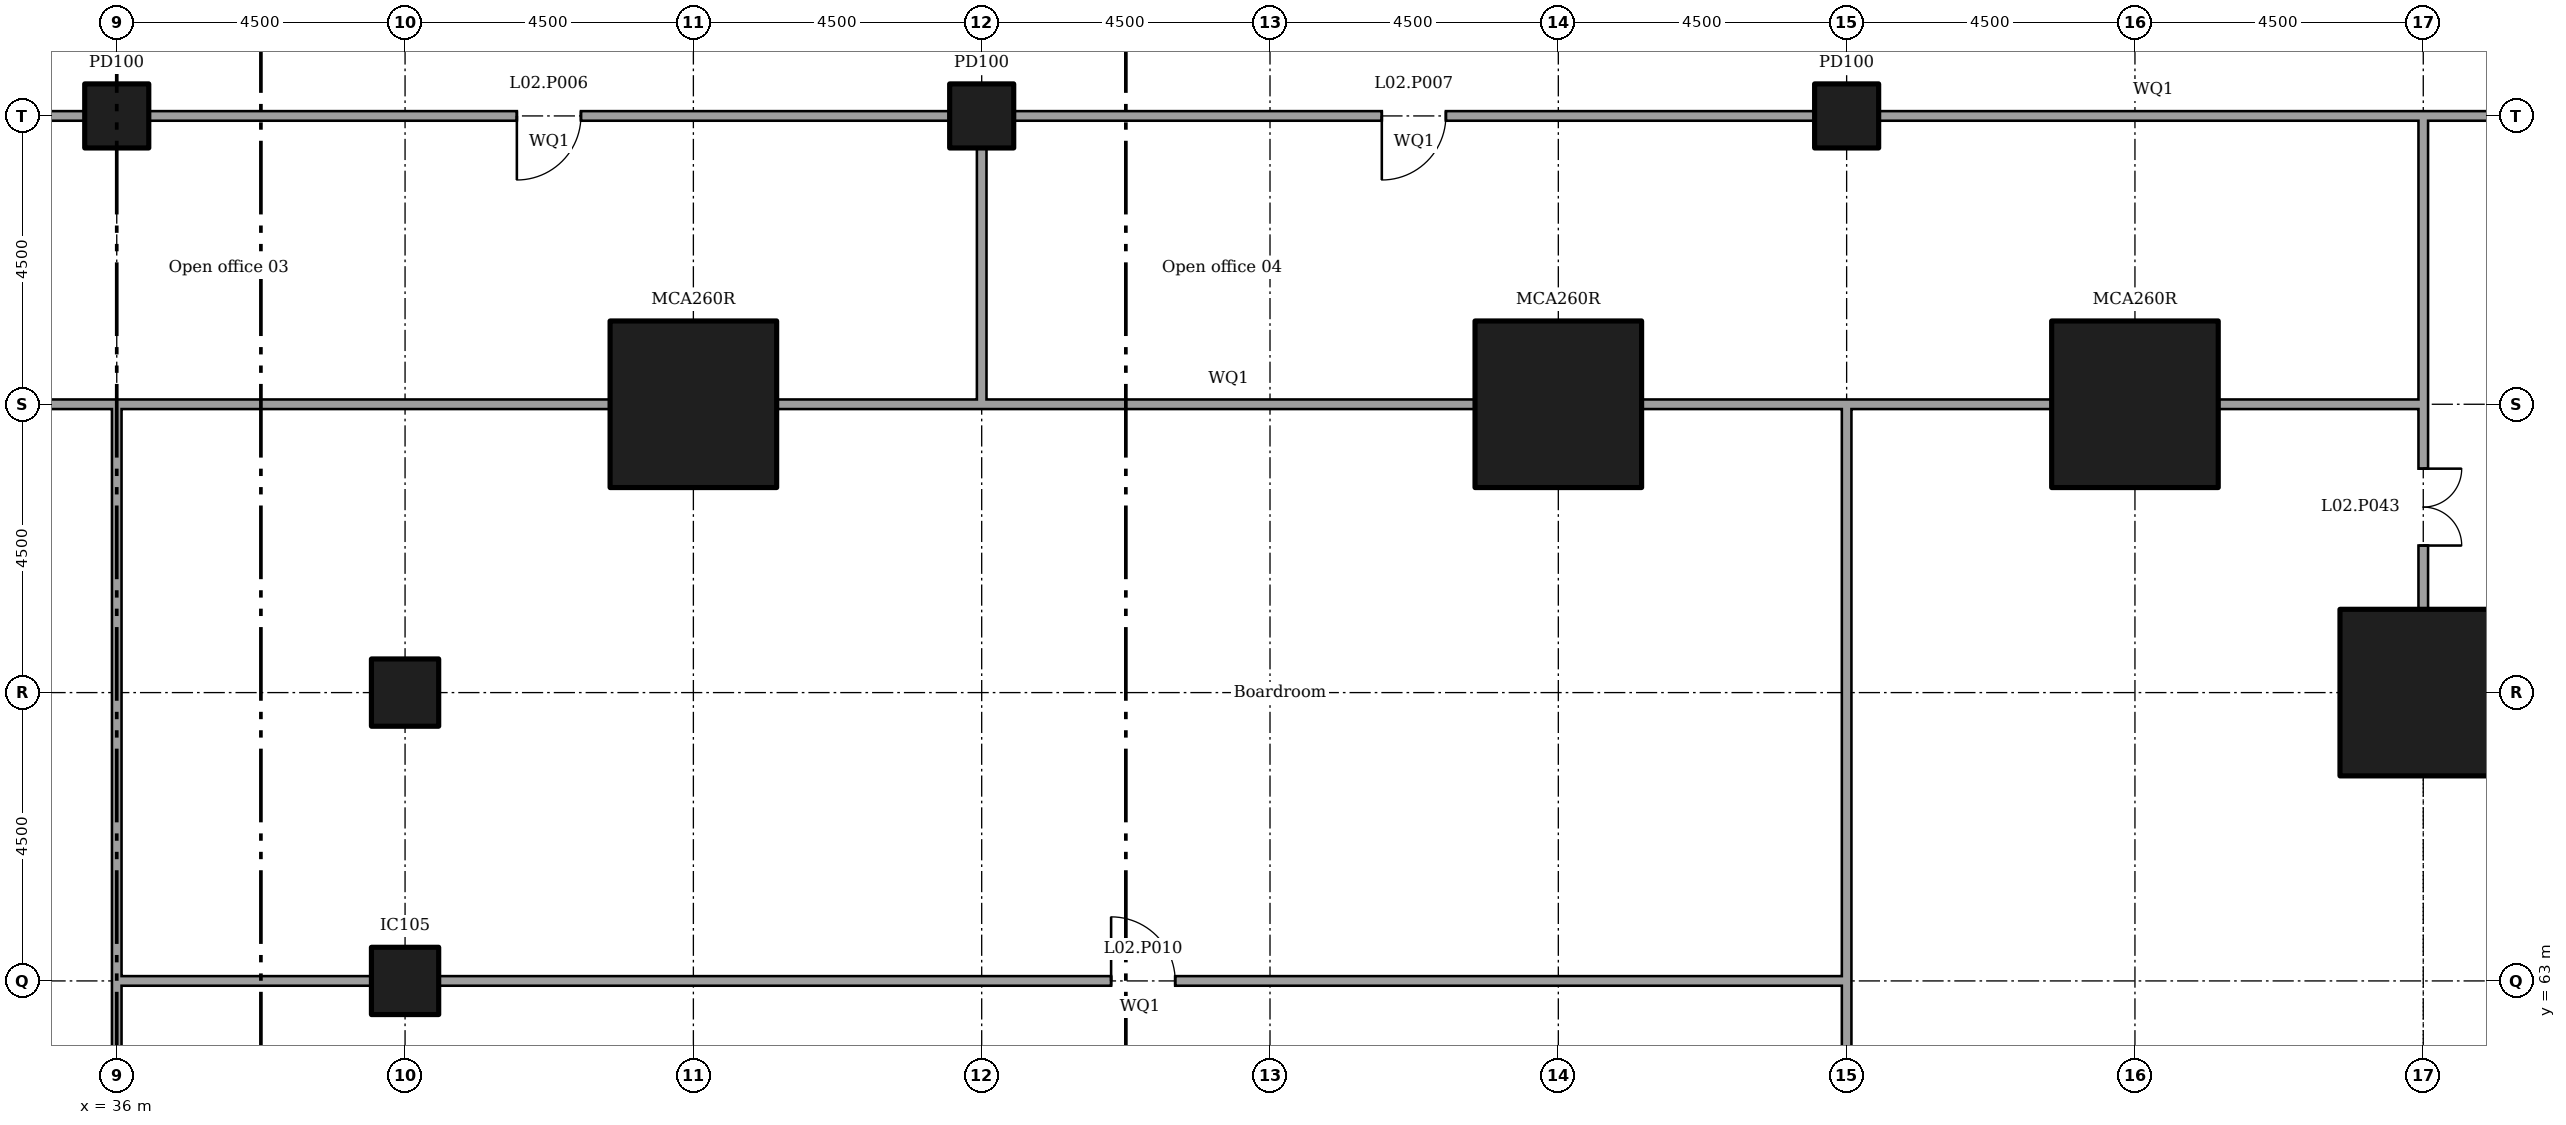
"""IFC4 building model, lengths in metres.
Left out: names, types, materials, properties, quantities, classifications, styles, units other than length and angle.
Written with IfcOpenShell. Run it as: python <this file> out.ifc"""

import sys

from ifc_helpers import new_model, si_unit, direction, frame, frame_2d, origin, origin_2d, place, context, subcontext, project, spatial, rectangle, extrude, element, fill, save


model = new_model("IFC4")
c1 = context("Model", 3, precision=1e-05, world=origin(), true_north=direction((0.0, 1.0)))
c2 = subcontext(c1, "Body", "Model", "MODEL_VIEW")
j1 = project(units=[si_unit("LENGTHUNIT", "METRE"), si_unit("PLANEANGLEUNIT", "RADIAN")], contexts=[c1])
p1 = place(None, origin())
s1 = spatial("IfcSite", under=j1, at=p1, CompositionType="ELEMENT")
p2 = place(p1, origin())
s2 = spatial("IfcBuilding", under=s1, at=p2, CompositionType="ELEMENT")
p3 = place(p2, frame((0.0, 0.0, 11.5)))
s3 = spatial("IfcBuildingStorey", under=s2, at=p3, CompositionType="ELEMENT", Elevation=11.5)
for number, where in (
    (1, (45.0, 72.0, 0.0)),
    (2, (58.5, 72.0, 0.0)),
    (3, (67.5, 72.0, 0.0)),
    (4, (72.0, 67.5, 0.0)),
):
    element("IfcColumn", number, at=place(p3, frame(where)), inside=s3, PredefinedType="COLUMN", context=c2, shape_type="SweptSolid", body=[
        extrude(rectangle(XDim=2.6, YDim=2.6, at=origin_2d()), origin(), (0.0, 0.0, 1.0), 5.0),
    ])
for number, where in (
    (5, (40.5, 63.0, 0.0)),
    (6, (40.5, 67.5, 0.0)),
):
    element("IfcColumn", number, at=place(p3, frame(where)), inside=s3, PredefinedType="COLUMN", context=c2, shape_type="SweptSolid", body=[
        extrude(rectangle(XDim=1.05, YDim=1.05, at=origin_2d()), origin(), (0.0, 0.0, 1.0), 5.0),
    ])
for number, where in (
    (7, (36.0, 76.5, 0.0)),
    (8, (49.5, 76.5, 0.0)),
    (9, (63.0, 76.5, 0.0)),
):
    element("IfcColumn", number, at=place(p3, frame(where)), inside=s3, PredefinedType="COLUMN", context=c2, shape_type="SweptSolid", body=[
        extrude(rectangle(XDim=1.0, YDim=1.0, at=origin_2d()), origin(), (0.0, 0.0, 1.0), 5.0),
    ])
p4 = place(p2, frame((0.0, 0.0, 6.0)))
s4 = spatial("IfcBuildingStorey", under=s2, at=p4, CompositionType="ELEMENT", Elevation=6.0)
p5 = place(p4, frame((72.0, 59.795, 0.0), z_axis=(0.0, 0.0, 1.0), x_axis=(0.0, 1.0, 0.0)))
e10 = element("IfcWall", 10, at=p5, inside=s4, PredefinedType="SOLIDWALL", context=c2, shape_type="SweptSolid", body=[
    extrude(rectangle(XDim=6.41, YDim=0.3, at=frame_2d((3.205, 0.0))), origin(), (0.0, 0.0, 1.0), 10.05),
])
p6 = place(p3, frame((27.0, 76.5, 0.0)))
e11 = element("IfcWall", 11, at=p6, inside=s3, PredefinedType="PARTITIONING", context=c2, shape_type="SweptSolid", body=[
    extrude(rectangle(XDim=8.505, YDim=0.15, at=frame_2d((4.252, 0.0))), origin(), (0.0, 0.0, 1.0), 4.55),
])
p7 = place(p3, frame((36.495, 76.5, 0.0)))
e12 = element("IfcWall", 12, at=p7, inside=s3, PredefinedType="PARTITIONING", context=c2, shape_type="SweptSolid", body=[
    extrude(rectangle(XDim=12.51, YDim=0.15, at=frame_2d((6.255, 0.0))), origin(), (0.0, 0.0, 1.0), 4.55),
])
p8 = place(p7, frame((5.75, 0.0, 0.0)))
e13 = element("IfcOpeningElement", 13, at=p8, cuts=e12, PredefinedType="OPENING", context=c2, shape_type="SweptSolid", body=[
    extrude(rectangle(XDim=1.0, YDim=2.1, at=frame_2d((0.5, 1.05))), frame((0.0, 0.085, 0.0), z_axis=(0.0, -1.0, 0.0), x_axis=(1.0, 0.0, 0.0)), (0.0, 0.0, 1.0), 0.17),
])
p9 = place(p3, frame((49.995, 76.5, 0.0)))
e14 = element("IfcWall", 14, at=p9, inside=s3, PredefinedType="PARTITIONING", context=c2, shape_type="SweptSolid", body=[
    extrude(rectangle(XDim=12.51, YDim=0.15, at=frame_2d((6.255, 0.0))), origin(), (0.0, 0.0, 1.0), 4.55),
])
p10 = place(p9, frame((5.75, 0.0, 0.0)))
e15 = element("IfcOpeningElement", 15, at=p10, cuts=e14, PredefinedType="OPENING", context=c2, shape_type="SweptSolid", body=[
    extrude(rectangle(XDim=1.0, YDim=2.1, at=frame_2d((0.5, 1.05))), frame((0.0, 0.085, 0.0), z_axis=(0.0, -1.0, 0.0), x_axis=(1.0, 0.0, 0.0)), (0.0, 0.0, 1.0), 0.17),
])
p11 = place(p3, frame((63.495, 76.5, 0.0)))
e16 = element("IfcWall", 16, at=p11, inside=s3, PredefinedType="PARTITIONING", context=c2, shape_type="SweptSolid", body=[
    extrude(rectangle(XDim=8.58, YDim=0.15, at=frame_2d((4.29, 0.0))), origin(), (0.0, 0.0, 1.0), 4.55),
])
p12 = place(p3, frame((72.0, 76.5, 0.0)))
e17 = element("IfcWall", 17, at=p12, inside=s3, PredefinedType="PARTITIONING", context=c2, shape_type="SweptSolid", body=[
    extrude(rectangle(XDim=4.005, YDim=0.15, at=frame_2d((2.002, 0.0))), origin(), (0.0, 0.0, 1.0), 4.55),
])
p13 = place(p12, frame((1.1, 0.0, 0.0)))
e18 = element("IfcOpeningElement", 18, at=p13, cuts=e17, PredefinedType="OPENING", context=c2, shape_type="SweptSolid", body=[
    extrude(rectangle(XDim=1.8, YDim=2.1, at=frame_2d((0.9, 1.05))), frame((0.0, 0.085, 0.0), z_axis=(0.0, -1.0, 0.0), x_axis=(1.0, 0.0, 0.0)), (0.0, 0.0, 1.0), 0.17),
])
p14 = place(p3, frame((49.5, 71.925, 0.0), z_axis=(0.0, 0.0, 1.0), x_axis=(0.0, 1.0, 0.0)))
e19 = element("IfcWall", 19, at=p14, inside=s3, PredefinedType="PARTITIONING", context=c2, shape_type="SweptSolid", body=[
    extrude(rectangle(XDim=4.08, YDim=0.15, at=frame_2d((2.04, 0.0))), origin(), (0.0, 0.0, 1.0), 4.55),
])
p15 = place(p3, frame((35.925, 72.0, 0.0)))
e20 = element("IfcWall", 20, at=p15, inside=s3, PredefinedType="PARTITIONING", context=c2, shape_type="SweptSolid", body=[
    extrude(rectangle(XDim=7.78, YDim=0.15, at=frame_2d((3.89, 0.0))), origin(), (0.0, 0.0, 1.0), 4.55),
])
p16 = place(p3, frame((46.295, 72.0, 0.0)))
e21 = element("IfcWall", 21, at=p16, inside=s3, PredefinedType="PARTITIONING", context=c2, shape_type="SweptSolid", body=[
    extrude(rectangle(XDim=3.13, YDim=0.15, at=frame_2d((1.565, 0.0))), origin(), (0.0, 0.0, 1.0), 4.55),
])
p17 = place(p3, frame((32.795, 72.0, 0.0)))
e22 = element("IfcWall", 22, at=p17, inside=s3, PredefinedType="PARTITIONING", context=c2, shape_type="SweptSolid", body=[
    extrude(rectangle(XDim=3.205, YDim=0.15, at=frame_2d((1.603, 0.0))), origin(), (0.0, 0.0, 1.0), 4.55),
])
for number, where in (
    (23, (62.925, 72.0, 0.0)),
    (24, (68.795, 72.0, 0.0)),
):
    element("IfcWall", number, at=place(p3, frame(where)), inside=s3, PredefinedType="PARTITIONING", context=c2, shape_type="SweptSolid", body=[
        extrude(rectangle(XDim=3.28, YDim=0.15, at=frame_2d((1.64, 0.0))), origin(), (0.0, 0.0, 1.0), 4.55),
    ])
p18 = place(p3, frame((49.5, 72.0, 0.0)))
e25 = element("IfcWall", 25, at=p18, inside=s3, PredefinedType="PARTITIONING", context=c2, shape_type="SweptSolid", body=[
    extrude(rectangle(XDim=7.705, YDim=0.15, at=frame_2d((3.853, 0.0))), origin(), (0.0, 0.0, 1.0), 4.55),
])
p19 = place(p3, frame((59.795, 72.0, 0.0)))
e26 = element("IfcWall", 26, at=p19, inside=s3, PredefinedType="PARTITIONING", context=c2, shape_type="SweptSolid", body=[
    extrude(rectangle(XDim=3.205, YDim=0.15, at=frame_2d((1.603, 0.0))), origin(), (0.0, 0.0, 1.0), 4.55),
])
p20 = place(p3, frame((72.0, 72.0, 0.0), z_axis=(0.0, 0.0, 1.0), x_axis=(0.0, 1.0, 0.0)))
e27 = element("IfcWall", 27, at=p20, inside=s3, PredefinedType="PARTITIONING", context=c2, shape_type="SweptSolid", body=[
    extrude(rectangle(XDim=4.425, YDim=0.15, at=frame_2d((2.212, 0.0))), origin(), (0.0, 0.0, 1.0), 4.55),
])
p21 = place(p3, frame((63.0, 62.925, 0.0), z_axis=(0.0, 0.0, 1.0), x_axis=(0.0, 1.0, 0.0)))
e28 = element("IfcWall", 28, at=p21, inside=s3, PredefinedType="PARTITIONING", context=c2, shape_type="SweptSolid", body=[
    extrude(rectangle(XDim=9.0, YDim=0.15, at=frame_2d((4.5, 0.0))), origin(), (0.0, 0.0, 1.0), 4.55),
])
p22 = place(p3, frame((63.0, 59.02, 0.0), z_axis=(0.0, 0.0, 1.0), x_axis=(0.0, 1.0, 0.0)))
e29 = element("IfcWall", 29, at=p22, inside=s3, PredefinedType="PARTITIONING", context=c2, shape_type="SweptSolid", body=[
    extrude(rectangle(XDim=3.98, YDim=0.15, at=frame_2d((1.99, 0.0))), origin(), (0.0, 0.0, 1.0), 4.55),
])
p23 = place(p22, frame((1.1, 0.0, 0.0)))
e30 = element("IfcOpeningElement", 30, at=p23, cuts=e29, PredefinedType="OPENING", context=c2, shape_type="SweptSolid", body=[
    extrude(rectangle(XDim=1.8, YDim=2.1, at=frame_2d((0.9, 1.05))), frame((0.0, 0.085, 0.0), z_axis=(0.0, -1.0, 0.0), x_axis=(1.0, 0.0, 0.0)), (0.0, 0.0, 1.0), 0.17),
])
p24 = place(p3, frame((72.0, 68.795, 0.0), z_axis=(0.0, 0.0, 1.0), x_axis=(0.0, 1.0, 0.0)))
e31 = element("IfcWall", 31, at=p24, inside=s3, PredefinedType="PARTITIONING", context=c2, shape_type="SweptSolid", body=[
    extrude(rectangle(XDim=3.13, YDim=0.15, at=frame_2d((1.565, 0.0))), origin(), (0.0, 0.0, 1.0), 4.55),
])
p25 = place(p24, frame((1.0, 0.0, 0.0)))
e32 = element("IfcOpeningElement", 32, at=p25, cuts=e31, PredefinedType="OPENING", context=c2, shape_type="SweptSolid", body=[
    extrude(rectangle(XDim=1.2, YDim=2.1, at=frame_2d((0.6, 1.05))), frame((0.0, 0.085, 0.0), z_axis=(0.0, -1.0, 0.0), x_axis=(1.0, 0.0, 0.0)), (0.0, 0.0, 1.0), 0.17),
])
p26 = place(p3, frame((36.0, 62.925, 0.0), z_axis=(0.0, 0.0, 1.0), x_axis=(0.0, 1.0, 0.0)))
e33 = element("IfcWall", 33, at=p26, inside=s3, PredefinedType="PARTITIONING", context=c2, shape_type="SweptSolid", body=[
    extrude(rectangle(XDim=9.0, YDim=0.15, at=frame_2d((4.5, 0.0))), origin(), (0.0, 0.0, 1.0), 4.55),
])
p27 = place(p3, frame((36.075, 63.0, 0.0)))
e34 = element("IfcWall", 34, at=p27, inside=s3, PredefinedType="PARTITIONING", context=c2, shape_type="SweptSolid", body=[
    extrude(rectangle(XDim=3.905, YDim=0.15, at=frame_2d((1.953, 0.0))), origin(), (0.0, 0.0, 1.0), 4.55),
])
p28 = place(p3, frame((41.02, 63.0, 0.0)))
e35 = element("IfcWall", 35, at=p28, inside=s3, PredefinedType="PARTITIONING", context=c2, shape_type="SweptSolid", body=[
    extrude(rectangle(XDim=21.905, YDim=0.15, at=frame_2d((10.953, 0.0))), origin(), (0.0, 0.0, 1.0), 4.55),
])
p29 = place(p28, frame((10.5, 0.0, 0.0)))
e36 = element("IfcOpeningElement", 36, at=p29, cuts=e35, PredefinedType="OPENING", context=c2, shape_type="SweptSolid", body=[
    extrude(rectangle(XDim=1.0, YDim=2.1, at=frame_2d((0.5, 1.05))), frame((0.0, 0.085, 0.0), z_axis=(0.0, -1.0, 0.0), x_axis=(1.0, 0.0, 0.0)), (0.0, 0.0, 1.0), 0.17),
])
p30 = place(p3, frame((36.0, 49.5, 0.0), z_axis=(0.0, 0.0, 1.0), x_axis=(0.0, 1.0, 0.0)))
e37 = element("IfcWall", 37, at=p30, inside=s3, PredefinedType="PARTITIONING", context=c2, shape_type="SweptSolid", body=[
    extrude(rectangle(XDim=13.5, YDim=0.15, at=frame_2d((6.75, 0.0))), origin(), (0.0, 0.0, 1.0), 4.55),
])
p31 = place(p30, frame((6.25, 0.0, 0.0)))
e38 = element("IfcOpeningElement", 38, at=p31, cuts=e37, PredefinedType="OPENING", context=c2, shape_type="SweptSolid", body=[
    extrude(rectangle(XDim=1.0, YDim=2.1, at=frame_2d((0.5, 1.05))), frame((0.0, 0.085, 0.0), z_axis=(0.0, -1.0, 0.0), x_axis=(1.0, 0.0, 0.0)), (0.0, 0.0, 1.0), 0.17),
])
p32 = place(p8, frame((1.0, 0.0, 0.0), x_axis=(-1.0, 0.0, 0.0)))
e39 = element("IfcDoor", 39, at=p32, inside=s3, OperationType="SINGLE_SWING_LEFT", PredefinedType="DOOR", context=c2, shape_type="SweptSolid", body=[
    extrude(rectangle(XDim=1.0, YDim=2.1, at=frame_2d((0.5, 1.05))), frame((0.0, 0.025, 0.0), z_axis=(0.0, -1.0, 0.0), x_axis=(1.0, 0.0, 0.0)), (0.0, 0.0, 1.0), 0.05),
])
fill(e13, e39)
p33 = place(p10, frame((1.0, 0.0, 0.0), x_axis=(-1.0, 0.0, 0.0)))
e40 = element("IfcDoor", 40, at=p33, inside=s3, OperationType="SINGLE_SWING_LEFT", PredefinedType="DOOR", context=c2, shape_type="SweptSolid", body=[
    extrude(rectangle(XDim=1.0, YDim=2.1, at=frame_2d((0.5, 1.05))), frame((0.0, 0.025, 0.0), z_axis=(0.0, -1.0, 0.0), x_axis=(1.0, 0.0, 0.0)), (0.0, 0.0, 1.0), 0.05),
])
fill(e15, e40)
p34 = place(p29, origin())
e41 = element("IfcDoor", 41, at=p34, inside=s3, OperationType="SINGLE_SWING_RIGHT", PredefinedType="DOOR", context=c2, shape_type="SweptSolid", body=[
    extrude(rectangle(XDim=1.0, YDim=2.1, at=frame_2d((0.5, 1.05))), frame((0.0, 0.025, 0.0), z_axis=(0.0, -1.0, 0.0), x_axis=(1.0, 0.0, 0.0)), (0.0, 0.0, 1.0), 0.05),
])
fill(e36, e41)
p35 = place(p25, frame((1.2, 0.0, 0.0), x_axis=(-1.0, 0.0, 0.0)))
e42 = element("IfcDoor", 42, at=p35, inside=s3, OperationType="DOUBLE_DOOR_SINGLE_SWING", PredefinedType="DOOR", context=c2, shape_type="SweptSolid", body=[
    extrude(rectangle(XDim=1.2, YDim=2.1, at=frame_2d((0.6, 1.05))), frame((0.0, 0.025, 0.0), z_axis=(0.0, -1.0, 0.0), x_axis=(1.0, 0.0, 0.0)), (0.0, 0.0, 1.0), 0.05),
])
fill(e32, e42)
save(model, sys.argv[1])
